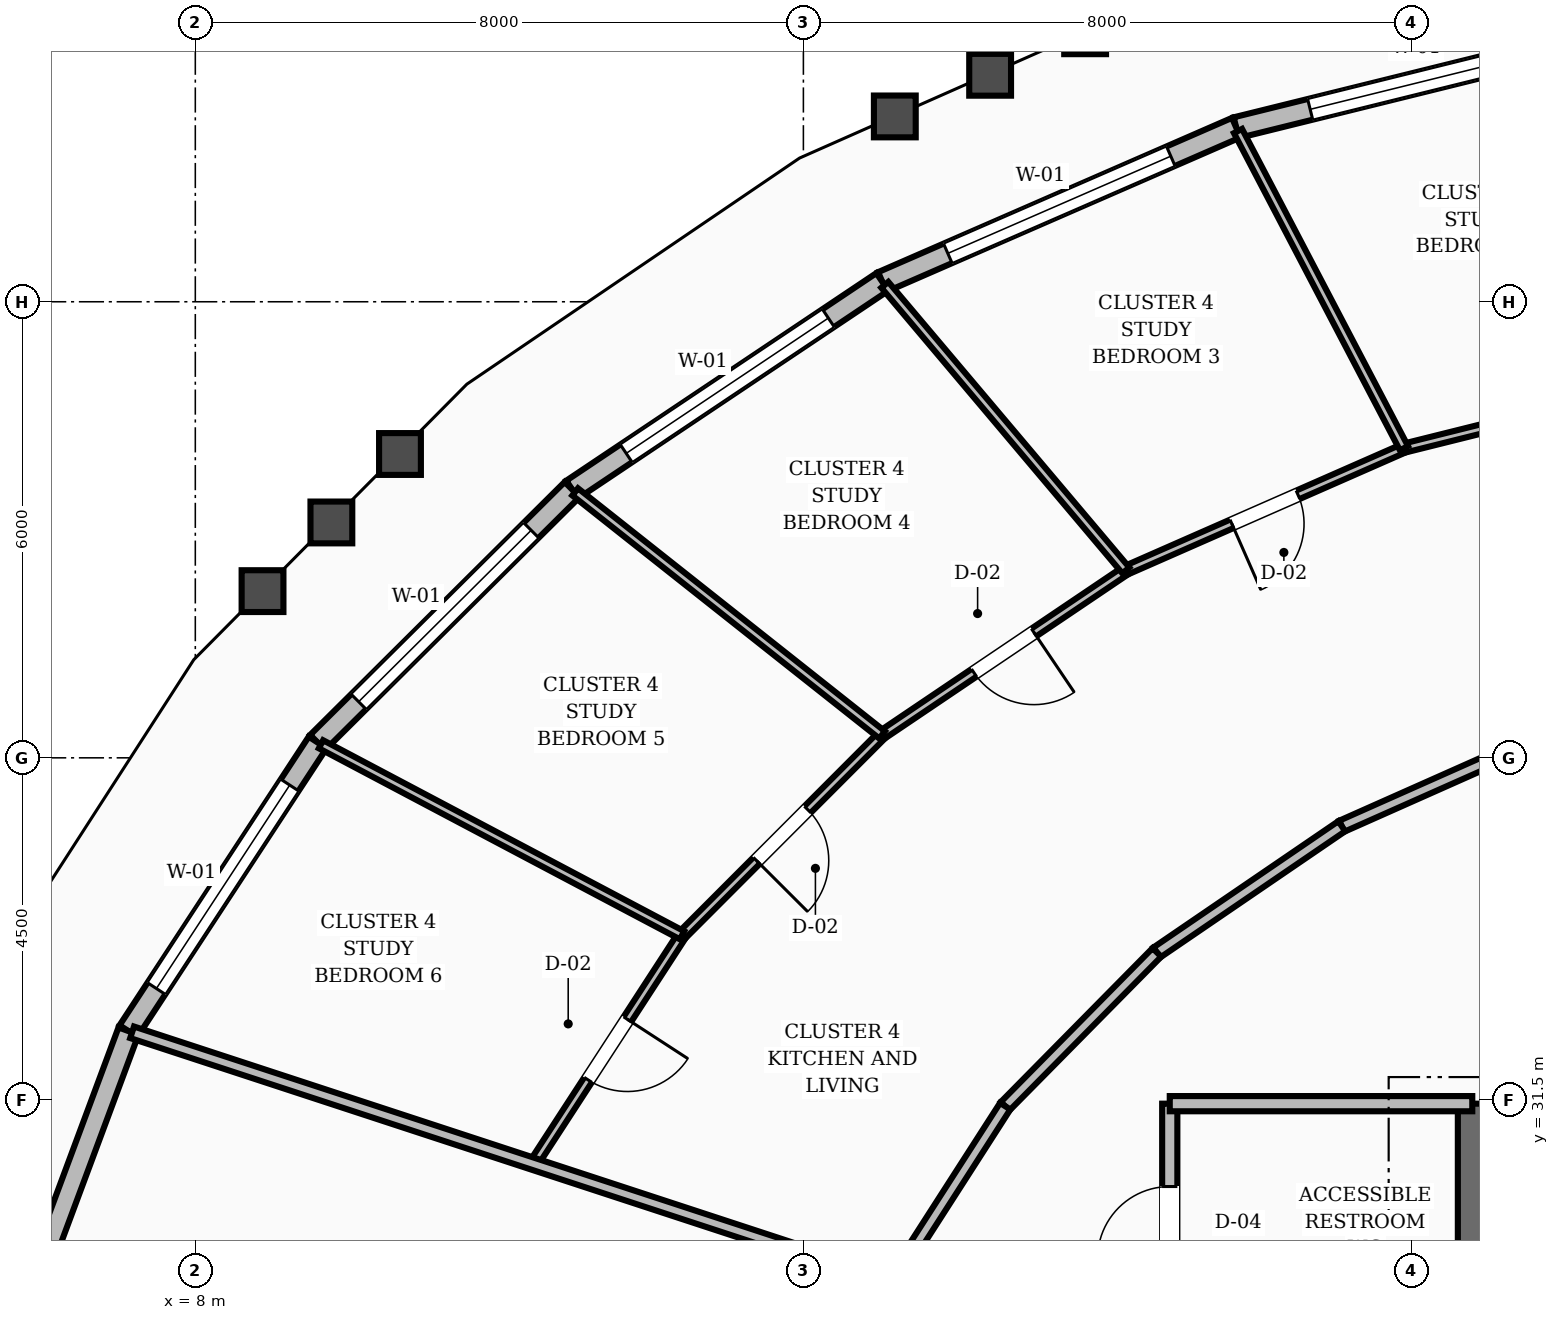
"""IFC4 building model, lengths in metres.
Left out: names, types, materials, properties, quantities, classifications, styles, units other than length and angle.
Written with IfcOpenShell. Run it as: python <this file> out.ifc"""

import sys

from ifc_helpers import new_model, si_unit, direction, frame, frame_2d, origin, place, context, subcontext, project, spatial, rectangle, extrude, element, fill, save


model = new_model("IFC4")
c1 = context("Model", 3, precision=1e-05, world=origin(), true_north=direction((0.0, 1.0)))
c2 = subcontext(c1, "Body", "Model", "MODEL_VIEW")
j1 = project(units=[si_unit("LENGTHUNIT", "METRE"), si_unit("PLANEANGLEUNIT", "RADIAN")], contexts=[c1])
p1 = place(None, origin())
s1 = spatial("IfcSite", under=j1, at=p1, CompositionType="ELEMENT")
p2 = place(p1, origin())
s2 = spatial("IfcBuilding", under=s1, at=p2, CompositionType="ELEMENT")
p3 = place(p2, frame((0.0, 0.0, 95.2)))
s3 = spatial("IfcBuildingStorey", under=s2, at=p3, CompositionType="ELEMENT", Elevation=95.2)
p4 = place(p3, frame((24.8, 25.15, 0.0), z_axis=(0.0, 0.0, 1.0), x_axis=(0.0, 1.0, 0.0)))
e1 = element("IfcWall", 1, at=p4, inside=s3, PredefinedType="SHEAR", context=c2, shape_type="SweptSolid", body=[
    extrude(rectangle(XDim=6.3, YDim=0.38, at=frame_2d((3.15, 0.0))), origin(), (0.0, 0.0, 1.0), 3.6),
])
p5 = place(p3, frame((26.746, 45.54, 0.0), z_axis=(0.0, 0.0, 1.0), x_axis=(-0.970735648522, -0.240150579199, 0.0)))
e2 = element("IfcWall", 2, at=p5, inside=s3, PredefinedType="STANDARD", context=c2, shape_type="SweptSolid", body=[
    extrude(rectangle(XDim=5.204, YDim=0.28, at=frame_2d((2.602, 0.0))), origin(), (0.0, 0.0, 1.0), 2.71),
])
p6 = place(p5, frame((1.002, 0.0, 0.8)))
e3 = element("IfcOpeningElement", 3, at=p6, cuts=e2, PredefinedType="OPENING", context=c2, shape_type="SweptSolid", body=[
    extrude(rectangle(XDim=3.2, YDim=1.65, at=frame_2d((1.6, 0.825))), frame((0.0, 0.15, 0.0), z_axis=(0.0, -1.0, 0.0), x_axis=(1.0, 0.0, 0.0)), (0.0, 0.0, 1.0), 0.3),
])
p7 = place(p3, frame((21.695, 44.291, 0.0), z_axis=(0.0, 0.0, 1.0), x_axis=(-0.916680612936, -0.39962063744, 0.0)))
e4 = element("IfcWall", 4, at=p7, inside=s3, PredefinedType="STANDARD", context=c2, shape_type="SweptSolid", body=[
    extrude(rectangle(XDim=5.079, YDim=0.28, at=frame_2d((2.539, 0.0))), origin(), (0.0, 0.0, 1.0), 2.71),
])
p8 = place(p7, frame((0.939, 0.0, 0.8)))
e5 = element("IfcOpeningElement", 5, at=p8, cuts=e4, PredefinedType="OPENING", context=c2, shape_type="SweptSolid", body=[
    extrude(rectangle(XDim=3.2, YDim=1.65, at=frame_2d((1.6, 0.825))), frame((0.0, 0.15, 0.0), z_axis=(0.0, -1.0, 0.0), x_axis=(1.0, 0.0, 0.0)), (0.0, 0.0, 1.0), 0.3),
])
p9 = place(p3, frame((17.039, 42.261, 0.0), z_axis=(0.0, 0.0, 1.0), x_axis=(-0.831046915145, -0.556202323645, 0.0)))
e6 = element("IfcWall", 6, at=p9, inside=s3, PredefinedType="STANDARD", context=c2, shape_type="SweptSolid", body=[
    extrude(rectangle(XDim=4.91, YDim=0.28, at=frame_2d((2.455, 0.0))), origin(), (0.0, 0.0, 1.0), 2.71),
])
p10 = place(p9, frame((0.855, 0.0, 0.8)))
e7 = element("IfcOpeningElement", 7, at=p10, cuts=e6, PredefinedType="OPENING", context=c2, shape_type="SweptSolid", body=[
    extrude(rectangle(XDim=3.2, YDim=1.65, at=frame_2d((1.6, 0.825))), frame((0.0, 0.15, 0.0), z_axis=(0.0, -1.0, 0.0), x_axis=(1.0, 0.0, 0.0)), (0.0, 0.0, 1.0), 0.3),
])
p11 = place(p3, frame((12.958, 39.53, 0.0), z_axis=(0.0, 0.0, 1.0), x_axis=(-0.70930102543, -0.70490570669, 0.0)))
e8 = element("IfcWall", 8, at=p11, inside=s3, PredefinedType="STANDARD", context=c2, shape_type="SweptSolid", body=[
    extrude(rectangle(XDim=4.721, YDim=0.28, at=frame_2d((2.361, 0.0))), origin(), (0.0, 0.0, 1.0), 2.71),
])
p12 = place(p11, frame((0.761, 0.0, 0.8)))
e9 = element("IfcOpeningElement", 9, at=p12, cuts=e8, PredefinedType="OPENING", context=c2, shape_type="SweptSolid", body=[
    extrude(rectangle(XDim=3.2, YDim=1.65, at=frame_2d((1.6, 0.825))), frame((0.0, 0.15, 0.0), z_axis=(0.0, -1.0, 0.0), x_axis=(1.0, 0.0, 0.0)), (0.0, 0.0, 1.0), 0.3),
])
p13 = place(p3, frame((9.609, 36.202, 0.0), z_axis=(0.0, 0.0, 1.0), x_axis=(-0.548143021063, -0.836384617541, 0.0)))
e10 = element("IfcWall", 10, at=p13, inside=s3, PredefinedType="STANDARD", context=c2, shape_type="SweptSolid", body=[
    extrude(rectangle(XDim=4.54, YDim=0.28, at=frame_2d((2.27, 0.0))), origin(), (0.0, 0.0, 1.0), 2.71),
])
p14 = place(p13, frame((0.67, 0.0, 0.8)))
e11 = element("IfcOpeningElement", 11, at=p14, cuts=e10, PredefinedType="OPENING", context=c2, shape_type="SweptSolid", body=[
    extrude(rectangle(XDim=3.2, YDim=1.65, at=frame_2d((1.6, 0.825))), frame((0.0, 0.15, 0.0), z_axis=(0.0, -1.0, 0.0), x_axis=(1.0, 0.0, 0.0)), (0.0, 0.0, 1.0), 0.3),
])
p15 = place(p3, frame((7.121, 32.405, 0.0), z_axis=(0.0, 0.0, 1.0), x_axis=(-0.348632733014, -0.937259418449, 0.0)))
e12 = element("IfcWall", 12, at=p15, inside=s3, PredefinedType="STANDARD", context=c2, shape_type="SweptSolid", body=[
    extrude(rectangle(XDim=4.396, YDim=0.28, at=frame_2d((2.198, 0.0))), origin(), (0.0, 0.0, 1.0), 2.71),
])
p16 = place(p3, frame((20.82, 28.32, 0.0), z_axis=(0.0, 0.0, 1.0), x_axis=(0.0, 1.0, 0.0)))
e13 = element("IfcWall", 13, at=p16, inside=s3, PredefinedType="SOLIDWALL", context=c2, shape_type="SweptSolid", body=[
    extrude(rectangle(XDim=3.13, YDim=0.2, at=frame_2d((1.565, 0.0))), origin(), (0.0, 0.0, 1.0), 2.71),
])
p17 = place(p16, frame((1.09, 0.0, 0.0)))
e14 = element("IfcOpeningElement", 14, at=p17, cuts=e13, PredefinedType="OPENING", context=c2, shape_type="SweptSolid", body=[
    extrude(rectangle(XDim=0.95, YDim=2.1, at=frame_2d((0.475, 1.05))), frame((0.0, 0.11, 0.0), z_axis=(0.0, -1.0, 0.0), x_axis=(1.0, 0.0, 0.0)), (0.0, 0.0, 1.0), 0.22),
])
p18 = place(p3, frame((20.82, 31.45, 0.0), z_axis=(0.0, 0.0, 1.0), x_axis=(1.0, 0.0, 0.0)))
e15 = element("IfcWall", 15, at=p18, inside=s3, PredefinedType="SOLIDWALL", context=c2, shape_type="SweptSolid", body=[
    extrude(rectangle(XDim=3.98, YDim=0.2, at=frame_2d((1.99, 0.0))), origin(), (0.0, 0.0, 1.0), 2.71),
])
p19 = place(p3, frame((25.858, 36.334, 0.0), z_axis=(0.0, 0.0, 1.0), x_axis=(-0.913768445178, -0.406235434936, 0.0)))
e16 = element("IfcWall", 16, at=p19, inside=s3, PredefinedType="SOLIDWALL", context=c2, shape_type="SweptSolid", body=[
    extrude(rectangle(XDim=3.037, YDim=0.16, at=frame_2d((1.519, 0.0))), origin(), (0.0, 0.0, 1.0), 2.71),
])
p20 = place(p3, frame((23.083, 35.1, 0.0), z_axis=(0.0, 0.0, 1.0), x_axis=(-0.825929039072, -0.563774088104, 0.0)))
e17 = element("IfcWall", 17, at=p20, inside=s3, PredefinedType="SOLIDWALL", context=c2, shape_type="SweptSolid", body=[
    extrude(rectangle(XDim=2.945, YDim=0.16, at=frame_2d((1.472, 0.0))), origin(), (0.0, 0.0, 1.0), 2.71),
])
p21 = place(p3, frame((20.651, 33.44, 0.0), z_axis=(0.0, 0.0, 1.0), x_axis=(-0.702366174226, -0.711815816981, 0.0)))
e18 = element("IfcWall", 18, at=p21, inside=s3, PredefinedType="SOLIDWALL", context=c2, shape_type="SweptSolid", body=[
    extrude(rectangle(XDim=2.842, YDim=0.16, at=frame_2d((1.421, 0.0))), origin(), (0.0, 0.0, 1.0), 2.71),
])
p22 = place(p3, frame((18.655, 31.417, 0.0), z_axis=(0.0, 0.0, 1.0), x_axis=(-0.540595670038, -0.841282545603, 0.0)))
e19 = element("IfcWall", 19, at=p22, inside=s3, PredefinedType="SOLIDWALL", context=c2, shape_type="SweptSolid", body=[
    extrude(rectangle(XDim=2.744, YDim=0.16, at=frame_2d((1.372, 0.0))), origin(), (0.0, 0.0, 1.0), 2.71),
])
p23 = place(p3, frame((27.871, 41.063, 0.0), z_axis=(0.0, 0.0, 1.0), x_axis=(-0.970289731263, -0.241945939016, 0.0)))
e20 = element("IfcWall", 20, at=p23, inside=s3, PredefinedType="PARTITIONING", context=c2, shape_type="SweptSolid", body=[
    extrude(rectangle(XDim=4.092, YDim=0.12, at=frame_2d((2.046, 0.0))), origin(), (0.0, 0.0, 1.0), 2.71),
])
p24 = place(p23, frame((1.571, 0.0, 0.0)))
e21 = element("IfcOpeningElement", 21, at=p24, cuts=e20, PredefinedType="OPENING", context=c2, shape_type="SweptSolid", body=[
    extrude(rectangle(XDim=0.95, YDim=2.1, at=frame_2d((0.475, 1.05))), frame((0.0, 0.07, 0.0), z_axis=(0.0, -1.0, 0.0), x_axis=(1.0, 0.0, 0.0)), (0.0, 0.0, 1.0), 0.14),
])
p25 = place(p3, frame((23.901, 40.073, 0.0), z_axis=(0.0, 0.0, 1.0), x_axis=(-0.91551399957, -0.40228611285, 0.0)))
e22 = element("IfcWall", 22, at=p25, inside=s3, PredefinedType="PARTITIONING", context=c2, shape_type="SweptSolid", body=[
    extrude(rectangle(XDim=3.996, YDim=0.12, at=frame_2d((1.998, 0.0))), origin(), (0.0, 0.0, 1.0), 2.71),
])
p26 = place(p25, frame((1.523, 0.0, 0.0)))
e23 = element("IfcOpeningElement", 23, at=p26, cuts=e22, PredefinedType="OPENING", context=c2, shape_type="SweptSolid", body=[
    extrude(rectangle(XDim=0.95, YDim=2.1, at=frame_2d((0.475, 1.05))), frame((0.0, 0.07, 0.0), z_axis=(0.0, -1.0, 0.0), x_axis=(1.0, 0.0, 0.0)), (0.0, 0.0, 1.0), 0.14),
])
p27 = place(p3, frame((23.901, 40.073, 0.0), z_axis=(0.0, 0.0, 1.0), x_axis=(-0.463561399352, 0.886064799567, 0.0)))
e24 = element("IfcWall", 24, at=p27, inside=s3, PredefinedType="PARTITIONING", context=c2, shape_type="SweptSolid", body=[
    extrude(rectangle(XDim=4.709, YDim=0.12, at=frame_2d((2.355, 0.0))), origin(), (0.0, 0.0, 1.0), 2.71),
])
p28 = place(p3, frame((20.242, 38.466, 0.0), z_axis=(0.0, 0.0, 1.0), x_axis=(-0.828989117178, -0.559264734808, 0.0)))
e25 = element("IfcWall", 25, at=p28, inside=s3, PredefinedType="PARTITIONING", context=c2, shape_type="SweptSolid", body=[
    extrude(rectangle(XDim=3.869, YDim=0.12, at=frame_2d((1.934, 0.0))), origin(), (0.0, 0.0, 1.0), 2.71),
])
p29 = place(p28, frame((1.459, 0.0, 0.0)))
e26 = element("IfcOpeningElement", 26, at=p29, cuts=e25, PredefinedType="OPENING", context=c2, shape_type="SweptSolid", body=[
    extrude(rectangle(XDim=0.95, YDim=2.1, at=frame_2d((0.475, 1.05))), frame((0.0, 0.07, 0.0), z_axis=(0.0, -1.0, 0.0), x_axis=(1.0, 0.0, 0.0)), (0.0, 0.0, 1.0), 0.14),
])
p30 = place(p3, frame((20.242, 38.466, 0.0), z_axis=(0.0, 0.0, 1.0), x_axis=(-0.64500236789, 0.764180571211, 0.0)))
e27 = element("IfcWall", 27, at=p30, inside=s3, PredefinedType="PARTITIONING", context=c2, shape_type="SweptSolid", body=[
    extrude(rectangle(XDim=4.917, YDim=0.12, at=frame_2d((2.458, 0.0))), origin(), (0.0, 0.0, 1.0), 2.71),
])
p31 = place(p3, frame((17.035, 36.302, 0.0), z_axis=(0.0, 0.0, 1.0), x_axis=(-0.706483909955, -0.70772910423, 0.0)))
e28 = element("IfcWall", 28, at=p31, inside=s3, PredefinedType="PARTITIONING", context=c2, shape_type="SweptSolid", body=[
    extrude(rectangle(XDim=3.725, YDim=0.12, at=frame_2d((1.863, 0.0))), origin(), (0.0, 0.0, 1.0), 2.71),
])
p32 = place(p31, frame((1.388, 0.0, 0.0)))
e29 = element("IfcOpeningElement", 29, at=p32, cuts=e28, PredefinedType="OPENING", context=c2, shape_type="SweptSolid", body=[
    extrude(rectangle(XDim=0.95, YDim=2.1, at=frame_2d((0.475, 1.05))), frame((0.0, 0.07, 0.0), z_axis=(0.0, -1.0, 0.0), x_axis=(1.0, 0.0, 0.0)), (0.0, 0.0, 1.0), 0.14),
])
p33 = place(p3, frame((17.035, 36.302, 0.0), z_axis=(0.0, 0.0, 1.0), x_axis=(-0.784054475927, 0.620692016042, 0.0)))
e30 = element("IfcWall", 30, at=p33, inside=s3, PredefinedType="PARTITIONING", context=c2, shape_type="SweptSolid", body=[
    extrude(rectangle(XDim=5.15, YDim=0.12, at=frame_2d((2.575, 0.0))), origin(), (0.0, 0.0, 1.0), 2.71),
])
p34 = place(p3, frame((14.404, 33.666, 0.0), z_axis=(0.0, 0.0, 1.0), x_axis=(-0.545100755876, -0.838370542149, 0.0)))
e31 = element("IfcWall", 31, at=p34, inside=s3, PredefinedType="PARTITIONING", context=c2, shape_type="SweptSolid", body=[
    extrude(rectangle(XDim=3.588, YDim=0.12, at=frame_2d((1.794, 0.0))), origin(), (0.0, 0.0, 1.0), 2.71),
])
p35 = place(p34, frame((1.319, 0.0, 0.0)))
e32 = element("IfcOpeningElement", 32, at=p35, cuts=e31, PredefinedType="OPENING", context=c2, shape_type="SweptSolid", body=[
    extrude(rectangle(XDim=0.95, YDim=2.1, at=frame_2d((0.475, 1.05))), frame((0.0, 0.07, 0.0), z_axis=(0.0, -1.0, 0.0), x_axis=(1.0, 0.0, 0.0)), (0.0, 0.0, 1.0), 0.14),
])
p36 = place(p3, frame((14.404, 33.666, 0.0), z_axis=(0.0, 0.0, 1.0), x_axis=(-0.883961363843, 0.467559950417, 0.0)))
e33 = element("IfcWall", 33, at=p36, inside=s3, PredefinedType="PARTITIONING", context=c2, shape_type="SweptSolid", body=[
    extrude(rectangle(XDim=5.374, YDim=0.12, at=frame_2d((2.687, 0.0))), origin(), (0.0, 0.0, 1.0), 2.71),
])
p37 = place(p3, frame((17.172, 29.109, 0.0), z_axis=(0.0, 0.0, 1.0), x_axis=(-0.950223350547, 0.311569549339, 0.0)))
e34 = element("IfcWall", 34, at=p37, inside=s3, PredefinedType="SOLIDWALL", context=c2, shape_type="SweptSolid", body=[
    extrude(rectangle(XDim=10.527, YDim=0.16, at=frame_2d((5.264, 0.0))), origin(), (0.0, 0.0, 1.0), 2.71),
])
p38 = place(p6, origin())
e35 = element("IfcWindow", 35, at=p38, inside=s3, PartitioningType="SINGLE_PANEL", PredefinedType="WINDOW", context=c2, shape_type="SweptSolid", body=[
    extrude(rectangle(XDim=3.2, YDim=1.65, at=frame_2d((1.6, 0.825))), frame((0.0, 0.03, 0.0), z_axis=(0.0, -1.0, 0.0), x_axis=(1.0, 0.0, 0.0)), (0.0, 0.0, 1.0), 0.06),
])
fill(e3, e35)
p39 = place(p8, origin())
e36 = element("IfcWindow", 36, at=p39, inside=s3, PartitioningType="SINGLE_PANEL", PredefinedType="WINDOW", context=c2, shape_type="SweptSolid", body=[
    extrude(rectangle(XDim=3.2, YDim=1.65, at=frame_2d((1.6, 0.825))), frame((0.0, 0.03, 0.0), z_axis=(0.0, -1.0, 0.0), x_axis=(1.0, 0.0, 0.0)), (0.0, 0.0, 1.0), 0.06),
])
fill(e5, e36)
p40 = place(p10, origin())
e37 = element("IfcWindow", 37, at=p40, inside=s3, PartitioningType="SINGLE_PANEL", PredefinedType="WINDOW", context=c2, shape_type="SweptSolid", body=[
    extrude(rectangle(XDim=3.2, YDim=1.65, at=frame_2d((1.6, 0.825))), frame((0.0, 0.03, 0.0), z_axis=(0.0, -1.0, 0.0), x_axis=(1.0, 0.0, 0.0)), (0.0, 0.0, 1.0), 0.06),
])
fill(e7, e37)
p41 = place(p12, origin())
e38 = element("IfcWindow", 38, at=p41, inside=s3, PartitioningType="SINGLE_PANEL", PredefinedType="WINDOW", context=c2, shape_type="SweptSolid", body=[
    extrude(rectangle(XDim=3.2, YDim=1.65, at=frame_2d((1.6, 0.825))), frame((0.0, 0.03, 0.0), z_axis=(0.0, -1.0, 0.0), x_axis=(1.0, 0.0, 0.0)), (0.0, 0.0, 1.0), 0.06),
])
fill(e9, e38)
p42 = place(p14, origin())
e39 = element("IfcWindow", 39, at=p42, inside=s3, PartitioningType="SINGLE_PANEL", PredefinedType="WINDOW", context=c2, shape_type="SweptSolid", body=[
    extrude(rectangle(XDim=3.2, YDim=1.65, at=frame_2d((1.6, 0.825))), frame((0.0, 0.03, 0.0), z_axis=(0.0, -1.0, 0.0), x_axis=(1.0, 0.0, 0.0)), (0.0, 0.0, 1.0), 0.06),
])
fill(e11, e39)
p43 = place(p17, origin())
e40 = element("IfcDoor", 40, at=p43, inside=s3, OperationType="SINGLE_SWING_LEFT", PredefinedType="DOOR", context=c2, shape_type="SweptSolid", body=[
    extrude(rectangle(XDim=0.95, YDim=2.1, at=frame_2d((0.475, 1.05))), frame((0.0, 0.025, 0.0), z_axis=(0.0, -1.0, 0.0), x_axis=(1.0, 0.0, 0.0)), (0.0, 0.0, 1.0), 0.05),
])
fill(e14, e40)
p44 = place(p26, origin())
e41 = element("IfcDoor", 41, at=p44, inside=s3, OperationType="SINGLE_SWING_RIGHT", PredefinedType="DOOR", context=c2, shape_type="SweptSolid", body=[
    extrude(rectangle(XDim=0.95, YDim=2.1, at=frame_2d((0.475, 1.05))), frame((0.0, 0.025, 0.0), z_axis=(0.0, -1.0, 0.0), x_axis=(1.0, 0.0, 0.0)), (0.0, 0.0, 1.0), 0.05),
])
fill(e23, e41)
p45 = place(p29, origin())
e42 = element("IfcDoor", 42, at=p45, inside=s3, OperationType="SINGLE_SWING_LEFT", PredefinedType="DOOR", context=c2, shape_type="SweptSolid", body=[
    extrude(rectangle(XDim=0.95, YDim=2.1, at=frame_2d((0.475, 1.05))), frame((0.0, 0.025, 0.0), z_axis=(0.0, -1.0, 0.0), x_axis=(1.0, 0.0, 0.0)), (0.0, 0.0, 1.0), 0.05),
])
fill(e26, e42)
p46 = place(p32, origin())
e43 = element("IfcDoor", 43, at=p46, inside=s3, OperationType="SINGLE_SWING_RIGHT", PredefinedType="DOOR", context=c2, shape_type="SweptSolid", body=[
    extrude(rectangle(XDim=0.95, YDim=2.1, at=frame_2d((0.475, 1.05))), frame((0.0, 0.025, 0.0), z_axis=(0.0, -1.0, 0.0), x_axis=(1.0, 0.0, 0.0)), (0.0, 0.0, 1.0), 0.05),
])
fill(e29, e43)
p47 = place(p35, origin())
e44 = element("IfcDoor", 44, at=p47, inside=s3, OperationType="SINGLE_SWING_LEFT", PredefinedType="DOOR", context=c2, shape_type="SweptSolid", body=[
    extrude(rectangle(XDim=0.95, YDim=2.1, at=frame_2d((0.475, 1.05))), frame((0.0, 0.025, 0.0), z_axis=(0.0, -1.0, 0.0), x_axis=(1.0, 0.0, 0.0)), (0.0, 0.0, 1.0), 0.05),
])
fill(e32, e44)
save(model, sys.argv[1])
